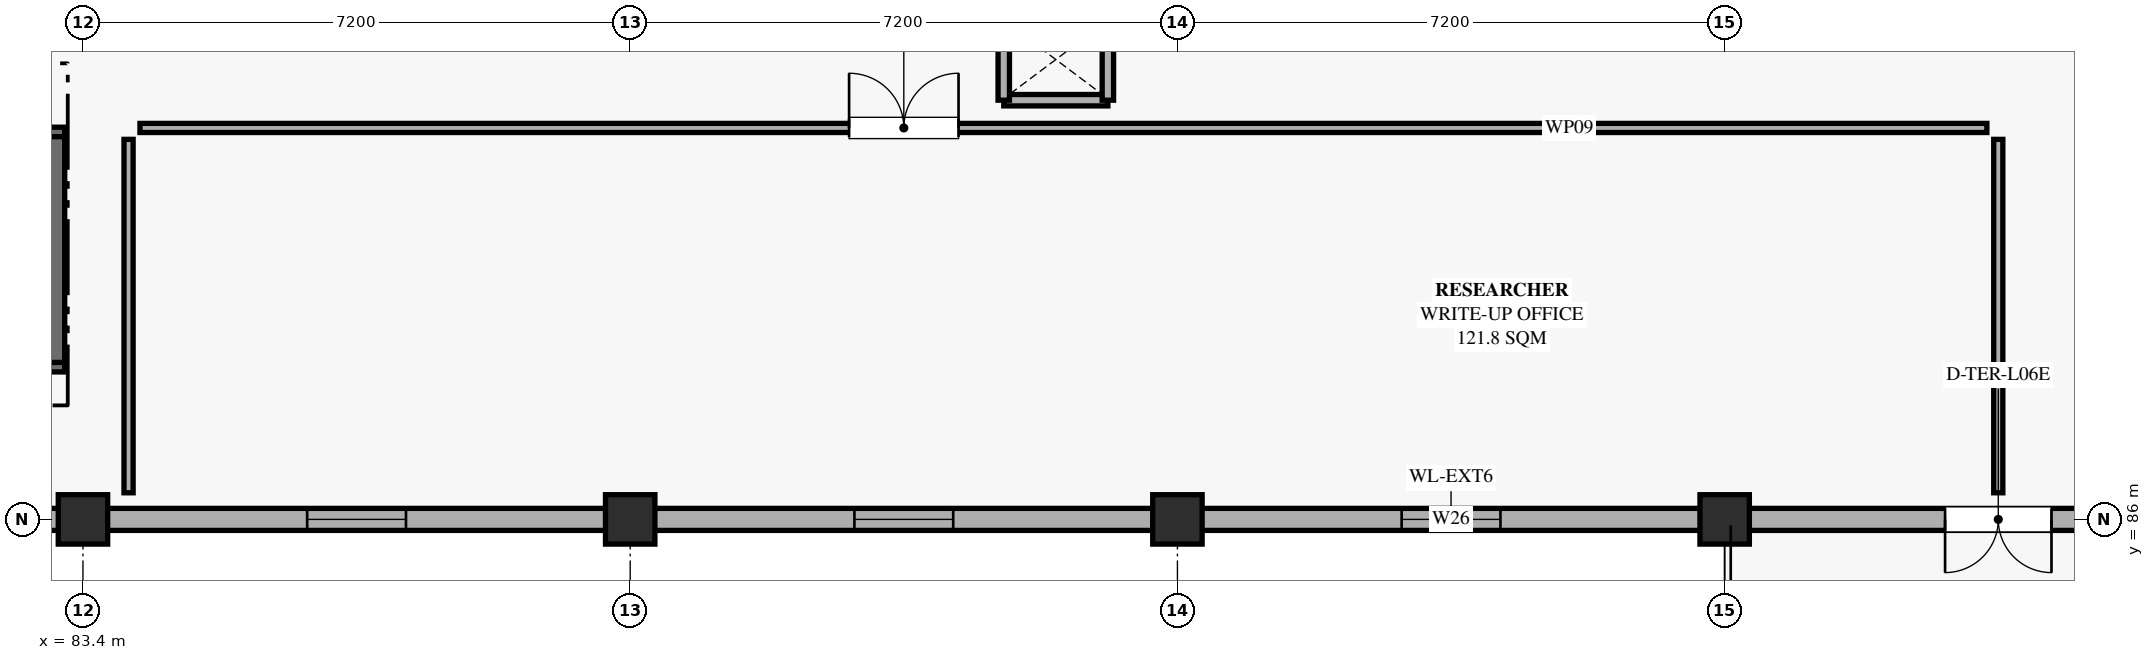
"""IFC4 building model, lengths in metres.
Left out: names, types, materials, properties, quantities, classifications, styles, units other than length and angle.
Written with IfcOpenShell. Run it as: python <this file> out.ifc"""

import sys

from ifc_helpers import new_model, si_unit, direction, frame, frame_2d, origin, origin_2d, place, context, subcontext, project, spatial, rectangle, extrude, element, fill, save


model = new_model("IFC4")
c1 = context("Model", 3, precision=1e-05, world=origin(), true_north=direction((0.0, 1.0)))
c2 = subcontext(c1, "Body", "Model", "MODEL_VIEW")
j1 = project(units=[si_unit("LENGTHUNIT", "METRE"), si_unit("PLANEANGLEUNIT", "RADIAN")], contexts=[c1])
p1 = place(None, origin())
s1 = spatial("IfcSite", under=j1, at=p1, CompositionType="ELEMENT")
p2 = place(p1, origin())
s2 = spatial("IfcBuilding", under=s1, at=p2, CompositionType="ELEMENT")
p3 = place(p2, frame((0.0, 0.0, 28.8)))
s3 = spatial("IfcBuildingStorey", under=s2, at=p3, CompositionType="ELEMENT", Elevation=28.8)
for number, where, z_axis, x_axis in (
    (1, (83.4, 86.0, 0.0), (0.0, 0.0, 1.0), (1.0, 0.0, 0.0)),
    (2, (90.6, 86.0, 0.0), (0.0, 0.0, 1.0), (1.0, 0.0, 0.0)),
    (3, (97.8, 86.0, 0.0), (0.0, 0.0, 1.0), (1.0, 0.0, 0.0)),
    (4, (105.0, 86.0, 0.0), (0.0, 0.0, 1.0), (1.0, 0.0, 0.0)),
):
    element("IfcColumn", number, at=place(p3, frame(where, z_axis=z_axis, x_axis=x_axis)), inside=s3, PredefinedType="COLUMN", context=c2, shape_type="SweptSolid", body=[
        extrude(rectangle(XDim=0.65, YDim=0.65, at=origin_2d()), origin(), (0.0, 0.0, 1.0), 4.5),
    ])
p4 = place(p3, frame((111.89, 86.0, 0.0), z_axis=(0.0, 0.0, 1.0), x_axis=(-1.0, 0.0, 0.0)))
e5 = element("IfcWall", 5, at=p4, inside=s3, PredefinedType="SOLIDWALL", context=c2, shape_type="SweptSolid", body=[
    extrude(rectangle(XDim=6.58, YDim=0.29, at=frame_2d((3.29, 0.0))), origin(), (0.0, 0.0, 1.0), 3.0),
])
p5 = place(p4, frame((2.59, 0.0, 0.0)))
e6 = element("IfcOpeningElement", 6, at=p5, cuts=e5, PredefinedType="OPENING", context=c2, shape_type="SweptSolid", body=[
    extrude(rectangle(XDim=1.4, YDim=2.18, at=frame_2d((0.7, 1.09))), frame((0.0, 0.155, 0.0), z_axis=(0.0, -1.0, 0.0), x_axis=(1.0, 0.0, 0.0)), (0.0, 0.0, 1.0), 0.31),
])
p6 = place(p3, frame((104.69, 86.0, 0.0), z_axis=(0.0, 0.0, 1.0), x_axis=(-1.0, 0.0, 0.0)))
e7 = element("IfcWall", 7, at=p6, inside=s3, PredefinedType="SOLIDWALL", context=c2, shape_type="SweptSolid", body=[
    extrude(rectangle(XDim=6.58, YDim=0.29, at=frame_2d((3.29, 0.0))), origin(), (0.0, 0.0, 1.0), 3.0),
])
p7 = place(p6, frame((2.64, 0.0, 0.85)))
e8 = element("IfcOpeningElement", 8, at=p7, cuts=e7, PredefinedType="OPENING", context=c2, shape_type="SweptSolid", body=[
    extrude(rectangle(XDim=1.3, YDim=1.9, at=frame_2d((0.65, 0.95))), frame((0.0, 0.155, 0.0), z_axis=(0.0, -1.0, 0.0), x_axis=(1.0, 0.0, 0.0)), (0.0, 0.0, 1.0), 0.31),
])
p8 = place(p3, frame((97.49, 86.0, 0.0), z_axis=(0.0, 0.0, 1.0), x_axis=(-1.0, 0.0, 0.0)))
e9 = element("IfcWall", 9, at=p8, inside=s3, PredefinedType="SOLIDWALL", context=c2, shape_type="SweptSolid", body=[
    extrude(rectangle(XDim=6.58, YDim=0.29, at=frame_2d((3.29, 0.0))), origin(), (0.0, 0.0, 1.0), 3.0),
])
p9 = place(p8, frame((2.64, 0.0, 0.85)))
e10 = element("IfcOpeningElement", 10, at=p9, cuts=e9, PredefinedType="OPENING", context=c2, shape_type="SweptSolid", body=[
    extrude(rectangle(XDim=1.3, YDim=1.9, at=frame_2d((0.65, 0.95))), frame((0.0, 0.155, 0.0), z_axis=(0.0, -1.0, 0.0), x_axis=(1.0, 0.0, 0.0)), (0.0, 0.0, 1.0), 0.31),
])
p10 = place(p3, frame((90.29, 86.0, 0.0), z_axis=(0.0, 0.0, 1.0), x_axis=(-1.0, 0.0, 0.0)))
e11 = element("IfcWall", 11, at=p10, inside=s3, PredefinedType="SOLIDWALL", context=c2, shape_type="SweptSolid", body=[
    extrude(rectangle(XDim=6.58, YDim=0.29, at=frame_2d((3.29, 0.0))), origin(), (0.0, 0.0, 1.0), 3.0),
])
p11 = place(p10, frame((2.64, 0.0, 0.85)))
e12 = element("IfcOpeningElement", 12, at=p11, cuts=e11, PredefinedType="OPENING", context=c2, shape_type="SweptSolid", body=[
    extrude(rectangle(XDim=1.3, YDim=1.9, at=frame_2d((0.65, 0.95))), frame((0.0, 0.155, 0.0), z_axis=(0.0, -1.0, 0.0), x_axis=(1.0, 0.0, 0.0)), (0.0, 0.0, 1.0), 0.31),
])
p12 = place(p3, frame((83.09, 86.0, 0.0), z_axis=(0.0, 0.0, 1.0), x_axis=(-1.0, 0.0, 0.0)))
e13 = element("IfcWall", 13, at=p12, inside=s3, PredefinedType="SOLIDWALL", context=c2, shape_type="SweptSolid", body=[
    extrude(rectangle(XDim=6.58, YDim=0.29, at=frame_2d((3.29, 0.0))), origin(), (0.0, 0.0, 1.0), 3.0),
])
p13 = place(p12, frame((2.64, 0.0, 0.85)))
e14 = element("IfcOpeningElement", 14, at=p13, cuts=e13, PredefinedType="OPENING", context=c2, shape_type="SweptSolid", body=[
    extrude(rectangle(XDim=1.3, YDim=1.9, at=frame_2d((0.65, 0.95))), frame((0.0, 0.155, 0.0), z_axis=(0.0, -1.0, 0.0), x_axis=(1.0, 0.0, 0.0)), (0.0, 0.0, 1.0), 0.31),
])
p14 = place(p3, frame((96.885, 91.515, 0.0), z_axis=(0.0, 0.0, 1.0), x_axis=(-1.0, 0.0, 0.0)))
e15 = element("IfcWall", 15, at=p14, inside=s3, PredefinedType="PARTITIONING", context=c2, shape_type="SweptSolid", body=[
    extrude(rectangle(XDim=1.37, YDim=0.15, at=frame_2d((0.685, 0.0))), origin(), (0.0, 0.0, 1.0), 2.98),
])
for number, where, z_axis, x_axis in (
    (16, (95.515, 91.515, 0.0), (0.0, 0.0, 1.0), (0.0, 1.0, 0.0)),
    (17, (96.885, 92.585, 0.0), (0.0, 0.0, 1.0), (0.0, -1.0, 0.0)),
):
    element("IfcWall", number, at=place(p3, frame(where, z_axis=z_axis, x_axis=x_axis)), inside=s3, PredefinedType="PARTITIONING", context=c2, shape_type="SweptSolid", body=[
        extrude(rectangle(XDim=1.07, YDim=0.15, at=frame_2d((0.535, 0.0))), origin(), (0.0, 0.0, 1.0), 2.98),
    ])
p15 = place(p3, frame((83.16, 88.065, 0.0), z_axis=(0.0, 0.0, 1.0), x_axis=(-1.0, 0.0, 0.0)))
e18 = element("IfcWall", 18, at=p15, inside=s3, PredefinedType="SHEAR", context=c2, shape_type="SweptSolid", body=[
    extrude(rectangle(XDim=2.62, YDim=0.25, at=frame_2d((1.31, 0.0))), origin(), (0.0, 0.0, 1.0), 4.23),
])
p16 = place(p3, frame((80.54, 91.035, 0.0), z_axis=(0.0, 0.0, 1.0), x_axis=(1.0, 0.0, 0.0)))
e19 = element("IfcWall", 19, at=p16, inside=s3, PredefinedType="SHEAR", context=c2, shape_type="SweptSolid", body=[
    extrude(rectangle(XDim=2.62, YDim=0.25, at=frame_2d((1.31, 0.0))), origin(), (0.0, 0.0, 1.0), 4.23),
])
p17 = place(p16, frame((0.76, 0.0, 0.0)))
e20 = element("IfcOpeningElement", 20, at=p17, cuts=e19, PredefinedType="OPENING", context=c2, shape_type="SweptSolid", body=[
    extrude(rectangle(XDim=1.1, YDim=2.2, at=frame_2d((0.55, 1.1))), frame((0.0, 0.135, 0.0), z_axis=(0.0, -1.0, 0.0), x_axis=(1.0, 0.0, 0.0)), (0.0, 0.0, 1.0), 0.27),
])
p18 = place(p3, frame((83.035, 91.035, 0.0), z_axis=(0.0, 0.0, 1.0), x_axis=(0.0, -1.0, 0.0)))
e21 = element("IfcWall", 21, at=p18, inside=s3, PredefinedType="SHEAR", context=c2, shape_type="SweptSolid", body=[
    extrude(rectangle(XDim=2.97, YDim=0.25, at=frame_2d((1.485, 0.0))), origin(), (0.0, 0.0, 1.0), 4.23),
])
p19 = place(p3, frame((84.15, 91.15, 0.0), z_axis=(0.0, 0.0, 1.0), x_axis=(1.0, 0.0, 0.0)))
e22 = element("IfcWall", 22, at=p19, inside=s3, PredefinedType="PARTITIONING", context=c2, shape_type="SweptSolid", body=[
    extrude(rectangle(XDim=24.3, YDim=0.12, at=frame_2d((12.15, 0.0))), origin(), (0.0, 0.0, 1.0), 2.98),
])
p20 = place(p19, frame((9.33, 0.0, 0.0)))
e23 = element("IfcOpeningElement", 23, at=p20, cuts=e22, PredefinedType="OPENING", context=c2, shape_type="SweptSolid", body=[
    extrude(rectangle(XDim=1.44, YDim=2.16, at=frame_2d((0.72, 1.08))), frame((0.0, 0.07, 0.0), z_axis=(0.0, -1.0, 0.0), x_axis=(1.0, 0.0, 0.0)), (0.0, 0.0, 1.0), 0.14),
])
for number, where, z_axis, x_axis in (
    (24, (84.0, 86.35, 0.0), (0.0, 0.0, 1.0), (0.0, 1.0, 0.0)),
    (25, (108.6, 91.0, 0.0), (0.0, 0.0, 1.0), (0.0, -1.0, 0.0)),
):
    element("IfcWall", number, at=place(p3, frame(where, z_axis=z_axis, x_axis=x_axis)), inside=s3, PredefinedType="PARTITIONING", context=c2, shape_type="SweptSolid", body=[
        extrude(rectangle(XDim=4.65, YDim=0.12, at=frame_2d((2.325, 0.0))), origin(), (0.0, 0.0, 1.0), 2.98),
    ])
p21 = place(p5, origin())
e26 = element("IfcDoor", 26, at=p21, inside=s3, OperationType="DOUBLE_DOOR_SINGLE_SWING", PredefinedType="DOOR", context=c2, shape_type="SweptSolid", body=[
    extrude(rectangle(XDim=1.4, YDim=2.18, at=frame_2d((0.7, 1.09))), frame((0.0, 0.025, 0.0), z_axis=(0.0, -1.0, 0.0), x_axis=(1.0, 0.0, 0.0)), (0.0, 0.0, 1.0), 0.05),
])
fill(e6, e26)
p22 = place(p7, origin())
e27 = element("IfcWindow", 27, at=p22, inside=s3, PartitioningType="SINGLE_PANEL", PredefinedType="WINDOW", context=c2, shape_type="SweptSolid", body=[
    extrude(rectangle(XDim=1.3, YDim=1.9, at=frame_2d((0.65, 0.95))), frame((0.0, 0.03, 0.0), z_axis=(0.0, -1.0, 0.0), x_axis=(1.0, 0.0, 0.0)), (0.0, 0.0, 1.0), 0.06),
])
fill(e8, e27)
p23 = place(p9, origin())
e28 = element("IfcWindow", 28, at=p23, inside=s3, PartitioningType="SINGLE_PANEL", PredefinedType="WINDOW", context=c2, shape_type="SweptSolid", body=[
    extrude(rectangle(XDim=1.3, YDim=1.9, at=frame_2d((0.65, 0.95))), frame((0.0, 0.03, 0.0), z_axis=(0.0, -1.0, 0.0), x_axis=(1.0, 0.0, 0.0)), (0.0, 0.0, 1.0), 0.06),
])
fill(e10, e28)
p24 = place(p11, origin())
e29 = element("IfcWindow", 29, at=p24, inside=s3, PartitioningType="SINGLE_PANEL", PredefinedType="WINDOW", context=c2, shape_type="SweptSolid", body=[
    extrude(rectangle(XDim=1.3, YDim=1.9, at=frame_2d((0.65, 0.95))), frame((0.0, 0.03, 0.0), z_axis=(0.0, -1.0, 0.0), x_axis=(1.0, 0.0, 0.0)), (0.0, 0.0, 1.0), 0.06),
])
fill(e12, e29)
p25 = place(p20, origin())
e30 = element("IfcDoor", 30, at=p25, inside=s3, OperationType="DOUBLE_DOOR_SINGLE_SWING", PredefinedType="DOOR", context=c2, shape_type="SweptSolid", body=[
    extrude(rectangle(XDim=1.44, YDim=2.16, at=frame_2d((0.72, 1.08))), frame((0.0, 0.025, 0.0), z_axis=(0.0, -1.0, 0.0), x_axis=(1.0, 0.0, 0.0)), (0.0, 0.0, 1.0), 0.05),
])
fill(e23, e30)
save(model, sys.argv[1])
